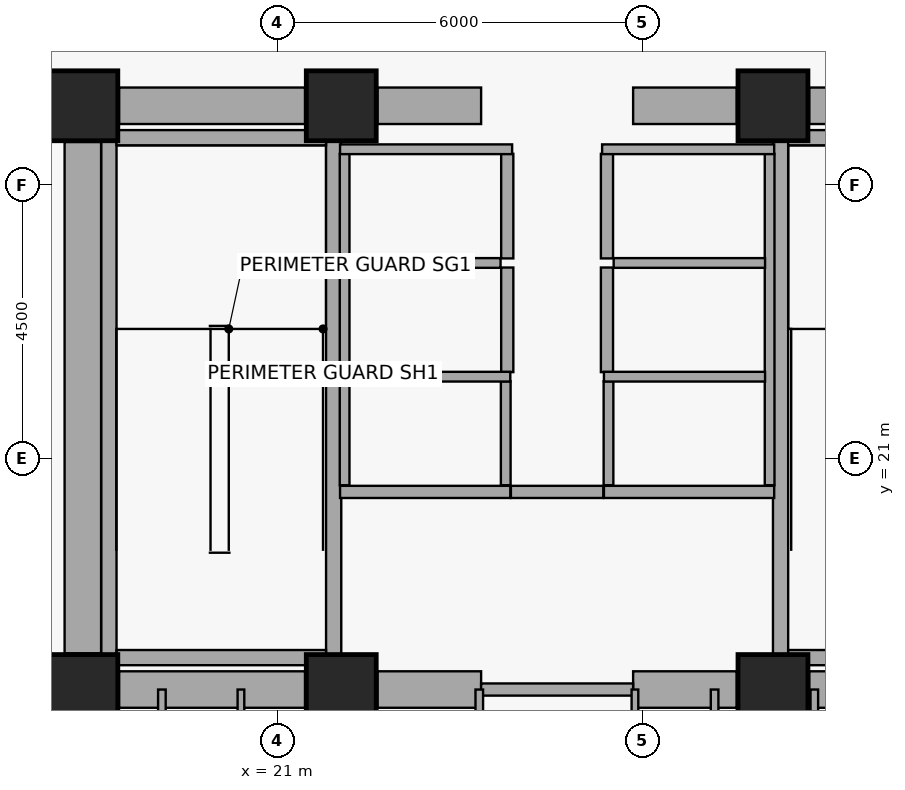
"""IFC4 building model, lengths in metres.
Left out: names, types, materials, properties, quantities, classifications, styles, units other than length and angle.
Written with IfcOpenShell. Run it as: python <this file> out.ifc"""

import sys

from ifc_helpers import new_model, si_unit, direction, frame, frame_2d, origin, origin_2d, place, context, subcontext, project, spatial, rectangle, extrude, element, fill, save


model = new_model("IFC4")
c1 = context("Model", 3, precision=1e-05, world=origin(), true_north=direction((0.0, 1.0)))
c2 = subcontext(c1, "Body", "Model", "MODEL_VIEW")
j1 = project(units=[si_unit("LENGTHUNIT", "METRE"), si_unit("PLANEANGLEUNIT", "RADIAN")], contexts=[c1])
p1 = place(None, origin())
s1 = spatial("IfcSite", under=j1, at=p1, CompositionType="ELEMENT")
p2 = place(p1, origin())
s2 = spatial("IfcBuilding", under=s1, at=p2, CompositionType="ELEMENT")
p3 = place(p2, frame((0.0, 0.0, 68.52)))
s3 = spatial("IfcBuildingStorey", under=s2, at=p3, CompositionType="ELEMENT", Elevation=68.52)
for number, where, z_axis, x_axis in (
    (1, (17.8, 17.2, 0.0), (0.0, 0.0, 1.0), (1.0, 0.0, 0.0)),
    (2, (22.05, 17.2, 0.0), (0.0, 0.0, 1.0), (1.0, 0.0, 0.0)),
    (3, (29.15, 17.2, 0.0), (0.0, 0.0, 1.0), (1.0, 0.0, 0.0)),
    (4, (17.8, 26.8, 0.0), (0.0, 0.0, 1.0), (1.0, 0.0, 0.0)),
    (5, (22.05, 26.8, 0.0), (0.0, 0.0, 1.0), (1.0, 0.0, 0.0)),
    (6, (29.15, 26.8, 0.0), (0.0, 0.0, 1.0), (1.0, 0.0, 0.0)),
):
    element("IfcColumn", number, at=place(p3, frame(where, z_axis=z_axis, x_axis=x_axis)), inside=s3, PredefinedType="COLUMN", context=c2, shape_type="SweptSolid", body=[
        extrude(rectangle(XDim=1.15, YDim=1.15, at=origin_2d()), origin(), (0.0, 0.0, 1.0), 3.72),
    ])
p4 = place(p3, frame((18.395, 17.2, 0.0), z_axis=(0.0, 0.0, 1.0), x_axis=(1.0, 0.0, 0.0)))
e7 = element("IfcWall", 7, at=p4, inside=s3, PredefinedType="SHEAR", context=c2, shape_type="SweptSolid", body=[
    extrude(rectangle(XDim=3.06, YDim=0.6, at=frame_2d((1.53, 0.0))), origin(), (0.0, 0.0, 1.0), 3.47),
])
p5 = place(p3, frame((22.645, 17.2, 0.0), z_axis=(0.0, 0.0, 1.0), x_axis=(1.0, 0.0, 0.0)))
e8 = element("IfcWall", 8, at=p5, inside=s3, PredefinedType="SHEAR", context=c2, shape_type="SweptSolid", body=[
    extrude(rectangle(XDim=1.705, YDim=0.6, at=frame_2d((0.853, 0.0))), origin(), (0.0, 0.0, 1.0), 3.47),
])
p6 = place(p3, frame((26.85, 17.2, 0.0), z_axis=(0.0, 0.0, 1.0), x_axis=(1.0, 0.0, 0.0)))
e9 = element("IfcWall", 9, at=p6, inside=s3, PredefinedType="SHEAR", context=c2, shape_type="SweptSolid", body=[
    extrude(rectangle(XDim=1.705, YDim=0.6, at=frame_2d((0.853, 0.0))), origin(), (0.0, 0.0, 1.0), 3.47),
])
p7 = place(p3, frame((29.745, 17.2, 0.0), z_axis=(0.0, 0.0, 1.0), x_axis=(1.0, 0.0, 0.0)))
e10 = element("IfcWall", 10, at=p7, inside=s3, PredefinedType="SHEAR", context=c2, shape_type="SweptSolid", body=[
    extrude(rectangle(XDim=3.06, YDim=0.6, at=frame_2d((1.53, 0.0))), origin(), (0.0, 0.0, 1.0), 3.47),
])
p8 = place(p3, frame((18.395, 26.8, 0.0), z_axis=(0.0, 0.0, 1.0), x_axis=(1.0, 0.0, 0.0)))
e11 = element("IfcWall", 11, at=p8, inside=s3, PredefinedType="SHEAR", context=c2, shape_type="SweptSolid", body=[
    extrude(rectangle(XDim=3.06, YDim=0.6, at=frame_2d((1.53, 0.0))), origin(), (0.0, 0.0, 1.0), 3.47),
])
p9 = place(p3, frame((22.645, 26.8, 0.0), z_axis=(0.0, 0.0, 1.0), x_axis=(1.0, 0.0, 0.0)))
e12 = element("IfcWall", 12, at=p9, inside=s3, PredefinedType="SHEAR", context=c2, shape_type="SweptSolid", body=[
    extrude(rectangle(XDim=1.705, YDim=0.6, at=frame_2d((0.853, 0.0))), origin(), (0.0, 0.0, 1.0), 3.47),
])
p10 = place(p3, frame((26.85, 26.8, 0.0), z_axis=(0.0, 0.0, 1.0), x_axis=(1.0, 0.0, 0.0)))
e13 = element("IfcWall", 13, at=p10, inside=s3, PredefinedType="SHEAR", context=c2, shape_type="SweptSolid", body=[
    extrude(rectangle(XDim=1.705, YDim=0.6, at=frame_2d((0.853, 0.0))), origin(), (0.0, 0.0, 1.0), 3.47),
])
p11 = place(p3, frame((29.745, 26.8, 0.0), z_axis=(0.0, 0.0, 1.0), x_axis=(1.0, 0.0, 0.0)))
e14 = element("IfcWall", 14, at=p11, inside=s3, PredefinedType="SHEAR", context=c2, shape_type="SweptSolid", body=[
    extrude(rectangle(XDim=3.06, YDim=0.6, at=frame_2d((1.53, 0.0))), origin(), (0.0, 0.0, 1.0), 3.47),
])
p12 = place(p3, frame((17.8, 17.795, 0.0), z_axis=(0.0, 0.0, 1.0), x_axis=(0.0, 1.0, 0.0)))
e15 = element("IfcWall", 15, at=p12, inside=s3, PredefinedType="SHEAR", context=c2, shape_type="SweptSolid", body=[
    extrude(rectangle(XDim=8.41, YDim=0.6, at=frame_2d((4.205, 0.0))), origin(), (0.0, 0.0, 1.0), 3.47),
])
p13 = place(p3, frame((18.229, 17.6, 0.0), z_axis=(0.0, 0.0, 1.0), x_axis=(0.0, 1.0, 0.0)))
e16 = element("IfcWall", 16, at=p13, inside=s3, PredefinedType="SHEAR", context=c2, shape_type="SweptSolid", body=[
    extrude(rectangle(XDim=8.8, YDim=0.25, at=frame_2d((4.4, 0.0))), origin(), (0.0, 0.0, 1.0), 3.47),
])
p14 = place(p3, frame((21.925, 17.6, 0.0), z_axis=(0.0, 0.0, 1.0), x_axis=(0.0, 1.0, 0.0)))
e17 = element("IfcWall", 17, at=p14, inside=s3, PredefinedType="SHEAR", context=c2, shape_type="SweptSolid", body=[
    extrude(rectangle(XDim=8.8, YDim=0.25, at=frame_2d((4.4, 0.0))), origin(), (0.0, 0.0, 1.0), 3.47),
])
p15 = place(p14, frame((0.35, 0.0, 0.0)))
e18 = element("IfcOpeningElement", 18, at=p15, cuts=e17, PredefinedType="OPENING", context=c2, shape_type="SweptSolid", body=[
    extrude(rectangle(XDim=1.05, YDim=2.08, at=frame_2d((0.525, 1.04))), frame((0.0, 0.135, 0.0), z_axis=(0.0, -1.0, 0.0), x_axis=(1.0, 0.0, 0.0)), (0.0, 0.0, 1.0), 0.27),
])
for number, where, z_axis, x_axis in (
    (19, (18.354, 17.725, 0.0), (0.0, 0.0, 1.0), (1.0, 0.0, 0.0)),
    (20, (18.354, 26.275, 0.0), (0.0, 0.0, 1.0), (1.0, 0.0, 0.0)),
):
    element("IfcWall", number, at=place(p3, frame(where, z_axis=z_axis, x_axis=x_axis)), inside=s3, PredefinedType="SHEAR", context=c2, shape_type="SweptSolid", body=[
        extrude(rectangle(XDim=3.446, YDim=0.25, at=frame_2d((1.723, 0.0))), origin(), (0.0, 0.0, 1.0), 3.47),
    ])
p16 = place(p3, frame((29.275, 17.6, 0.0), z_axis=(0.0, 0.0, 1.0), x_axis=(0.0, 1.0, 0.0)))
e21 = element("IfcWall", 21, at=p16, inside=s3, PredefinedType="SHEAR", context=c2, shape_type="SweptSolid", body=[
    extrude(rectangle(XDim=8.8, YDim=0.25, at=frame_2d((4.4, 0.0))), origin(), (0.0, 0.0, 1.0), 3.47),
])
p17 = place(p16, frame((0.35, 0.0, 0.0)))
e22 = element("IfcOpeningElement", 22, at=p17, cuts=e21, PredefinedType="OPENING", context=c2, shape_type="SweptSolid", body=[
    extrude(rectangle(XDim=1.05, YDim=2.08, at=frame_2d((0.525, 1.04))), frame((0.0, 0.135, 0.0), z_axis=(0.0, -1.0, 0.0), x_axis=(1.0, 0.0, 0.0)), (0.0, 0.0, 1.0), 0.27),
])
for number, where, z_axis, x_axis in (
    (23, (29.4, 17.725, 0.0), (0.0, 0.0, 1.0), (1.0, 0.0, 0.0)),
    (24, (29.4, 26.275, 0.0), (0.0, 0.0, 1.0), (1.0, 0.0, 0.0)),
):
    element("IfcWall", number, at=place(p3, frame(where, z_axis=z_axis, x_axis=x_axis)), inside=s3, PredefinedType="SHEAR", context=c2, shape_type="SweptSolid", body=[
        extrude(rectangle(XDim=3.446, YDim=0.25, at=frame_2d((1.723, 0.0))), origin(), (0.0, 0.0, 1.0), 3.47),
    ])
p18 = place(p3, frame((24.35, 17.2, 0.0), z_axis=(0.0, 0.0, 1.0), x_axis=(1.0, 0.0, 0.0)))
e25 = element("IfcWall", 25, at=p18, inside=s3, PredefinedType="PARTITIONING", context=c2, shape_type="SweptSolid", body=[
    extrude(rectangle(XDim=2.5, YDim=0.2, at=frame_2d((1.25, 0.0))), origin(), (0.0, 0.0, 1.0), 2.6),
])
p19 = place(p18, frame((0.68, 0.0, 0.0)))
e26 = element("IfcOpeningElement", 26, at=p19, cuts=e25, PredefinedType="OPENING", context=c2, shape_type="SweptSolid", body=[
    extrude(rectangle(XDim=1.15, YDim=2.08, at=frame_2d((0.575, 1.04))), frame((0.0, 0.11, 0.0), z_axis=(0.0, -1.0, 0.0), x_axis=(1.0, 0.0, 0.0)), (0.0, 0.0, 1.0), 0.22),
])
p20 = place(p3, frame((24.84, 20.45, 0.0), z_axis=(0.0, 0.0, 1.0), x_axis=(1.0, 0.0, 0.0)))
e27 = element("IfcWall", 27, at=p20, inside=s3, PredefinedType="PARTITIONING", context=c2, shape_type="SweptSolid", body=[
    extrude(rectangle(XDim=1.52, YDim=0.2, at=frame_2d((0.76, 0.0))), origin(), (0.0, 0.0, 1.0), 3.47),
])
p21 = place(p20, frame((0.27, 0.0, 0.0)))
e28 = element("IfcOpeningElement", 28, at=p21, cuts=e27, PredefinedType="OPENING", context=c2, shape_type="SweptSolid", body=[
    extrude(rectangle(XDim=0.98, YDim=2.06, at=frame_2d((0.49, 1.03))), frame((0.0, 0.11, 0.0), z_axis=(0.0, -1.0, 0.0), x_axis=(1.0, 0.0, 0.0)), (0.0, 0.0, 1.0), 0.22),
])
p22 = place(p3, frame((22.03, 20.45, 0.0), z_axis=(0.0, 0.0, 1.0), x_axis=(1.0, 0.0, 0.0)))
e29 = element("IfcWall", 29, at=p22, inside=s3, PredefinedType="PARTITIONING", context=c2, shape_type="SweptSolid", body=[
    extrude(rectangle(XDim=2.8, YDim=0.2, at=frame_2d((1.4, 0.0))), origin(), (0.0, 0.0, 1.0), 3.47),
])
p23 = place(p22, frame((0.78, 0.0, 0.0)))
e30 = element("IfcOpeningElement", 30, at=p23, cuts=e29, PredefinedType="OPENING", context=c2, shape_type="SweptSolid", body=[
    extrude(rectangle(XDim=1.1, YDim=2.08, at=frame_2d((0.55, 1.04))), frame((0.0, 0.11, 0.0), z_axis=(0.0, -1.0, 0.0), x_axis=(1.0, 0.0, 0.0)), (0.0, 0.0, 1.0), 0.22),
])
p24 = place(p3, frame((26.37, 20.45, 0.0), z_axis=(0.0, 0.0, 1.0), x_axis=(1.0, 0.0, 0.0)))
e31 = element("IfcWall", 31, at=p24, inside=s3, PredefinedType="PARTITIONING", context=c2, shape_type="SweptSolid", body=[
    extrude(rectangle(XDim=2.8, YDim=0.2, at=frame_2d((1.4, 0.0))), origin(), (0.0, 0.0, 1.0), 3.47),
])
p25 = place(p24, frame((0.78, 0.0, 0.0)))
e32 = element("IfcOpeningElement", 32, at=p25, cuts=e31, PredefinedType="OPENING", context=c2, shape_type="SweptSolid", body=[
    extrude(rectangle(XDim=1.1, YDim=2.08, at=frame_2d((0.55, 1.04))), frame((0.0, 0.11, 0.0), z_axis=(0.0, -1.0, 0.0), x_axis=(1.0, 0.0, 0.0)), (0.0, 0.0, 1.0), 0.22),
])
p26 = place(p3, frame((24.78, 22.42, 0.0), z_axis=(0.0, 0.0, 1.0), x_axis=(0.0, 1.0, 0.0)))
e33 = element("IfcWall", 33, at=p26, inside=s3, PredefinedType="PARTITIONING", context=c2, shape_type="SweptSolid", body=[
    extrude(rectangle(XDim=1.72, YDim=0.2, at=frame_2d((0.86, 0.0))), origin(), (0.0, 0.0, 1.0), 3.47),
])
p27 = place(p26, frame((0.31, 0.0, 0.0)))
e34 = element("IfcOpeningElement", 34, at=p27, cuts=e33, PredefinedType="OPENING", context=c2, shape_type="SweptSolid", body=[
    extrude(rectangle(XDim=1.1, YDim=2.08, at=frame_2d((0.55, 1.04))), frame((0.0, 0.11, 0.0), z_axis=(0.0, -1.0, 0.0), x_axis=(1.0, 0.0, 0.0)), (0.0, 0.0, 1.0), 0.22),
])
p28 = place(p3, frame((24.78, 24.29, 0.0), z_axis=(0.0, 0.0, 1.0), x_axis=(0.0, 1.0, 0.0)))
e35 = element("IfcWall", 35, at=p28, inside=s3, PredefinedType="PARTITIONING", context=c2, shape_type="SweptSolid", body=[
    extrude(rectangle(XDim=1.72, YDim=0.2, at=frame_2d((0.86, 0.0))), origin(), (0.0, 0.0, 1.0), 3.47),
])
p29 = place(p28, frame((0.31, 0.0, 0.0)))
e36 = element("IfcOpeningElement", 36, at=p29, cuts=e35, PredefinedType="OPENING", context=c2, shape_type="SweptSolid", body=[
    extrude(rectangle(XDim=1.1, YDim=2.08, at=frame_2d((0.55, 1.04))), frame((0.0, 0.11, 0.0), z_axis=(0.0, -1.0, 0.0), x_axis=(1.0, 0.0, 0.0)), (0.0, 0.0, 1.0), 0.22),
])
p30 = place(p3, frame((26.42, 22.42, 0.0), z_axis=(0.0, 0.0, 1.0), x_axis=(0.0, 1.0, 0.0)))
e37 = element("IfcWall", 37, at=p30, inside=s3, PredefinedType="PARTITIONING", context=c2, shape_type="SweptSolid", body=[
    extrude(rectangle(XDim=1.72, YDim=0.2, at=frame_2d((0.86, 0.0))), origin(), (0.0, 0.0, 1.0), 3.47),
])
p31 = place(p30, frame((0.31, 0.0, 0.0)))
e38 = element("IfcOpeningElement", 38, at=p31, cuts=e37, PredefinedType="OPENING", context=c2, shape_type="SweptSolid", body=[
    extrude(rectangle(XDim=1.1, YDim=2.08, at=frame_2d((0.55, 1.04))), frame((0.0, 0.11, 0.0), z_axis=(0.0, -1.0, 0.0), x_axis=(1.0, 0.0, 0.0)), (0.0, 0.0, 1.0), 0.22),
])
p32 = place(p3, frame((26.42, 24.29, 0.0), z_axis=(0.0, 0.0, 1.0), x_axis=(0.0, 1.0, 0.0)))
e39 = element("IfcWall", 39, at=p32, inside=s3, PredefinedType="PARTITIONING", context=c2, shape_type="SweptSolid", body=[
    extrude(rectangle(XDim=1.72, YDim=0.2, at=frame_2d((0.86, 0.0))), origin(), (0.0, 0.0, 1.0), 3.47),
])
p33 = place(p32, frame((0.31, 0.0, 0.0)))
e40 = element("IfcOpeningElement", 40, at=p33, cuts=e39, PredefinedType="OPENING", context=c2, shape_type="SweptSolid", body=[
    extrude(rectangle(XDim=1.1, YDim=2.08, at=frame_2d((0.55, 1.04))), frame((0.0, 0.11, 0.0), z_axis=(0.0, -1.0, 0.0), x_axis=(1.0, 0.0, 0.0)), (0.0, 0.0, 1.0), 0.22),
])
p34 = place(p3, frame((22.105, 20.56, 0.0), z_axis=(0.0, 0.0, 1.0), x_axis=(0.0, 1.0, 0.0)))
e41 = element("IfcWall", 41, at=p34, inside=s3, PredefinedType="PARTITIONING", context=c2, shape_type="SweptSolid", body=[
    extrude(rectangle(XDim=5.45, YDim=0.16, at=frame_2d((2.725, 0.0))), origin(), (0.0, 0.0, 1.0), 3.47),
])
p35 = place(p3, frame((24.755, 20.56, 0.0), z_axis=(0.0, 0.0, 1.0), x_axis=(0.0, 1.0, 0.0)))
e42 = element("IfcWall", 42, at=p35, inside=s3, PredefinedType="PARTITIONING", context=c2, shape_type="SweptSolid", body=[
    extrude(rectangle(XDim=1.71, YDim=0.16, at=frame_2d((0.855, 0.0))), origin(), (0.0, 0.0, 1.0), 3.47),
])
p36 = place(p3, frame((22.18, 22.345, 0.0), z_axis=(0.0, 0.0, 1.0), x_axis=(1.0, 0.0, 0.0)))
e43 = element("IfcWall", 43, at=p36, inside=s3, PredefinedType="PARTITIONING", context=c2, shape_type="SweptSolid", body=[
    extrude(rectangle(XDim=2.65, YDim=0.16, at=frame_2d((1.325, 0.0))), origin(), (0.0, 0.0, 1.0), 3.47),
])
p37 = place(p3, frame((22.18, 24.215, 0.0), z_axis=(0.0, 0.0, 1.0), x_axis=(1.0, 0.0, 0.0)))
e44 = element("IfcWall", 44, at=p37, inside=s3, PredefinedType="PARTITIONING", context=c2, shape_type="SweptSolid", body=[
    extrude(rectangle(XDim=2.49, YDim=0.16, at=frame_2d((1.245, 0.0))), origin(), (0.0, 0.0, 1.0), 3.47),
])
p38 = place(p3, frame((22.03, 26.085, 0.0), z_axis=(0.0, 0.0, 1.0), x_axis=(1.0, 0.0, 0.0)))
e45 = element("IfcWall", 45, at=p38, inside=s3, PredefinedType="PARTITIONING", context=c2, shape_type="SweptSolid", body=[
    extrude(rectangle(XDim=2.83, YDim=0.16, at=frame_2d((1.415, 0.0))), origin(), (0.0, 0.0, 1.0), 3.47),
])
p39 = place(p3, frame((29.095, 20.56, 0.0), z_axis=(0.0, 0.0, 1.0), x_axis=(0.0, 1.0, 0.0)))
e46 = element("IfcWall", 46, at=p39, inside=s3, PredefinedType="PARTITIONING", context=c2, shape_type="SweptSolid", body=[
    extrude(rectangle(XDim=5.45, YDim=0.16, at=frame_2d((2.725, 0.0))), origin(), (0.0, 0.0, 1.0), 3.47),
])
p40 = place(p3, frame((26.445, 20.56, 0.0), z_axis=(0.0, 0.0, 1.0), x_axis=(0.0, 1.0, 0.0)))
e47 = element("IfcWall", 47, at=p40, inside=s3, PredefinedType="PARTITIONING", context=c2, shape_type="SweptSolid", body=[
    extrude(rectangle(XDim=1.71, YDim=0.16, at=frame_2d((0.855, 0.0))), origin(), (0.0, 0.0, 1.0), 3.47),
])
p41 = place(p3, frame((26.37, 22.345, 0.0), z_axis=(0.0, 0.0, 1.0), x_axis=(1.0, 0.0, 0.0)))
e48 = element("IfcWall", 48, at=p41, inside=s3, PredefinedType="PARTITIONING", context=c2, shape_type="SweptSolid", body=[
    extrude(rectangle(XDim=2.65, YDim=0.16, at=frame_2d((1.325, 0.0))), origin(), (0.0, 0.0, 1.0), 3.47),
])
p42 = place(p3, frame((26.53, 24.215, 0.0), z_axis=(0.0, 0.0, 1.0), x_axis=(1.0, 0.0, 0.0)))
e49 = element("IfcWall", 49, at=p42, inside=s3, PredefinedType="PARTITIONING", context=c2, shape_type="SweptSolid", body=[
    extrude(rectangle(XDim=2.49, YDim=0.16, at=frame_2d((1.245, 0.0))), origin(), (0.0, 0.0, 1.0), 3.47),
])
p43 = place(p3, frame((26.34, 26.085, 0.0), z_axis=(0.0, 0.0, 1.0), x_axis=(1.0, 0.0, 0.0)))
e50 = element("IfcWall", 50, at=p43, inside=s3, PredefinedType="PARTITIONING", context=c2, shape_type="SweptSolid", body=[
    extrude(rectangle(XDim=2.83, YDim=0.16, at=frame_2d((1.415, 0.0))), origin(), (0.0, 0.0, 1.0), 3.47),
])
p44 = place(p3, frame((19.1, 14.95, 0.0), z_axis=(0.0, 0.0, 1.0), x_axis=(0.0, 1.0, 0.0)))
e51 = element("IfcWall", 51, at=p44, inside=s3, PredefinedType="PARTITIONING", context=c2, shape_type="SweptSolid", body=[
    extrude(rectangle(XDim=2.25, YDim=0.125, at=frame_2d((1.125, 0.0))), origin(), (0.0, 0.0, 1.0), 2.6),
])
p45 = place(p3, frame((20.4, 14.95, 0.0), z_axis=(0.0, 0.0, 1.0), x_axis=(0.0, 1.0, 0.0)))
e52 = element("IfcWall", 52, at=p45, inside=s3, PredefinedType="PARTITIONING", context=c2, shape_type="SweptSolid", body=[
    extrude(rectangle(XDim=2.25, YDim=0.11, at=frame_2d((1.125, 0.0))), origin(), (0.0, 0.0, 1.0), 2.6),
])
p46 = place(p3, frame((22.36, 14.95, 0.0), z_axis=(0.0, 0.0, 1.0), x_axis=(0.0, 1.0, 0.0)))
e53 = element("IfcWall", 53, at=p46, inside=s3, PredefinedType="PARTITIONING", context=c2, shape_type="SweptSolid", body=[
    extrude(rectangle(XDim=2.25, YDim=0.125, at=frame_2d((1.125, 0.0))), origin(), (0.0, 0.0, 1.0), 2.2),
])
p47 = place(p3, frame((24.32, 14.95, 0.0), z_axis=(0.0, 0.0, 1.0), x_axis=(0.0, 1.0, 0.0)))
e54 = element("IfcWall", 54, at=p47, inside=s3, PredefinedType="PARTITIONING", context=c2, shape_type="SweptSolid", body=[
    extrude(rectangle(XDim=2.25, YDim=0.125, at=frame_2d((1.125, 0.0))), origin(), (0.0, 0.0, 1.0), 2.6),
])
p48 = place(p3, frame((26.88, 14.95, 0.0), z_axis=(0.0, 0.0, 1.0), x_axis=(0.0, 1.0, 0.0)))
e55 = element("IfcWall", 55, at=p48, inside=s3, PredefinedType="PARTITIONING", context=c2, shape_type="SweptSolid", body=[
    extrude(rectangle(XDim=2.25, YDim=0.11, at=frame_2d((1.125, 0.0))), origin(), (0.0, 0.0, 1.0), 2.6),
])
for number, where, z_axis, x_axis in (
    (56, (28.19, 14.95, 0.0), (0.0, 0.0, 1.0), (0.0, 1.0, 0.0)),
    (57, (29.83, 14.95, 0.0), (0.0, 0.0, 1.0), (0.0, 1.0, 0.0)),
):
    element("IfcWall", number, at=place(p3, frame(where, z_axis=z_axis, x_axis=x_axis)), inside=s3, PredefinedType="PARTITIONING", context=c2, shape_type="SweptSolid", body=[
        extrude(rectangle(XDim=2.25, YDim=0.125, at=frame_2d((1.125, 0.0))), origin(), (0.0, 0.0, 1.0), 2.6),
    ])
p49 = place(p15, origin())
e58 = element("IfcDoor", 58, at=p49, inside=s3, OperationType="SINGLE_SWING_LEFT", PredefinedType="DOOR", context=c2, shape_type="SweptSolid", body=[
    extrude(rectangle(XDim=1.05, YDim=2.08, at=frame_2d((0.525, 1.04))), frame((0.0, 0.025, 0.0), z_axis=(0.0, -1.0, 0.0), x_axis=(1.0, 0.0, 0.0)), (0.0, 0.0, 1.0), 0.05),
])
fill(e18, e58)
p50 = place(p17, origin())
e59 = element("IfcDoor", 59, at=p50, inside=s3, OperationType="SINGLE_SWING_RIGHT", PredefinedType="DOOR", context=c2, shape_type="SweptSolid", body=[
    extrude(rectangle(XDim=1.05, YDim=2.08, at=frame_2d((0.525, 1.04))), frame((0.0, 0.025, 0.0), z_axis=(0.0, -1.0, 0.0), x_axis=(1.0, 0.0, 0.0)), (0.0, 0.0, 1.0), 0.05),
])
fill(e22, e59)
p51 = place(p19, origin())
e60 = element("IfcDoor", 60, at=p51, inside=s3, OperationType="SINGLE_SWING_LEFT", PredefinedType="DOOR", context=c2, shape_type="SweptSolid", body=[
    extrude(rectangle(XDim=1.15, YDim=2.08, at=frame_2d((0.575, 1.04))), frame((0.0, 0.025, 0.0), z_axis=(0.0, -1.0, 0.0), x_axis=(1.0, 0.0, 0.0)), (0.0, 0.0, 1.0), 0.05),
])
fill(e26, e60)
p52 = place(p21, origin())
e61 = element("IfcDoor", 61, at=p52, inside=s3, OperationType="SINGLE_SWING_RIGHT", PredefinedType="DOOR", context=c2, shape_type="SweptSolid", body=[
    extrude(rectangle(XDim=0.98, YDim=2.06, at=frame_2d((0.49, 1.03))), frame((0.0, 0.025, 0.0), z_axis=(0.0, -1.0, 0.0), x_axis=(1.0, 0.0, 0.0)), (0.0, 0.0, 1.0), 0.05),
])
fill(e28, e61)
p53 = place(p23, origin())
e62 = element("IfcDoor", 62, at=p53, inside=s3, OperationType="DOUBLE_DOOR_SLIDING", PredefinedType="DOOR", context=c2, shape_type="SweptSolid", body=[
    extrude(rectangle(XDim=1.1, YDim=2.08, at=frame_2d((0.55, 1.04))), frame((0.0, 0.025, 0.0), z_axis=(0.0, -1.0, 0.0), x_axis=(1.0, 0.0, 0.0)), (0.0, 0.0, 1.0), 0.05),
])
fill(e30, e62)
p54 = place(p25, origin())
e63 = element("IfcDoor", 63, at=p54, inside=s3, OperationType="DOUBLE_DOOR_SLIDING", PredefinedType="DOOR", context=c2, shape_type="SweptSolid", body=[
    extrude(rectangle(XDim=1.1, YDim=2.08, at=frame_2d((0.55, 1.04))), frame((0.0, 0.025, 0.0), z_axis=(0.0, -1.0, 0.0), x_axis=(1.0, 0.0, 0.0)), (0.0, 0.0, 1.0), 0.05),
])
fill(e32, e63)
p55 = place(p27, origin())
e64 = element("IfcDoor", 64, at=p55, inside=s3, OperationType="DOUBLE_DOOR_SLIDING", PredefinedType="DOOR", context=c2, shape_type="SweptSolid", body=[
    extrude(rectangle(XDim=1.1, YDim=2.08, at=frame_2d((0.55, 1.04))), frame((0.0, 0.025, 0.0), z_axis=(0.0, -1.0, 0.0), x_axis=(1.0, 0.0, 0.0)), (0.0, 0.0, 1.0), 0.05),
])
fill(e34, e64)
p56 = place(p29, origin())
e65 = element("IfcDoor", 65, at=p56, inside=s3, OperationType="DOUBLE_DOOR_SLIDING", PredefinedType="DOOR", context=c2, shape_type="SweptSolid", body=[
    extrude(rectangle(XDim=1.1, YDim=2.08, at=frame_2d((0.55, 1.04))), frame((0.0, 0.025, 0.0), z_axis=(0.0, -1.0, 0.0), x_axis=(1.0, 0.0, 0.0)), (0.0, 0.0, 1.0), 0.05),
])
fill(e36, e65)
p57 = place(p31, origin())
e66 = element("IfcDoor", 66, at=p57, inside=s3, OperationType="DOUBLE_DOOR_SLIDING", PredefinedType="DOOR", context=c2, shape_type="SweptSolid", body=[
    extrude(rectangle(XDim=1.1, YDim=2.08, at=frame_2d((0.55, 1.04))), frame((0.0, 0.025, 0.0), z_axis=(0.0, -1.0, 0.0), x_axis=(1.0, 0.0, 0.0)), (0.0, 0.0, 1.0), 0.05),
])
fill(e38, e66)
p58 = place(p33, origin())
e67 = element("IfcDoor", 67, at=p58, inside=s3, OperationType="DOUBLE_DOOR_SLIDING", PredefinedType="DOOR", context=c2, shape_type="SweptSolid", body=[
    extrude(rectangle(XDim=1.1, YDim=2.08, at=frame_2d((0.55, 1.04))), frame((0.0, 0.025, 0.0), z_axis=(0.0, -1.0, 0.0), x_axis=(1.0, 0.0, 0.0)), (0.0, 0.0, 1.0), 0.05),
])
fill(e40, e67)
save(model, sys.argv[1])
